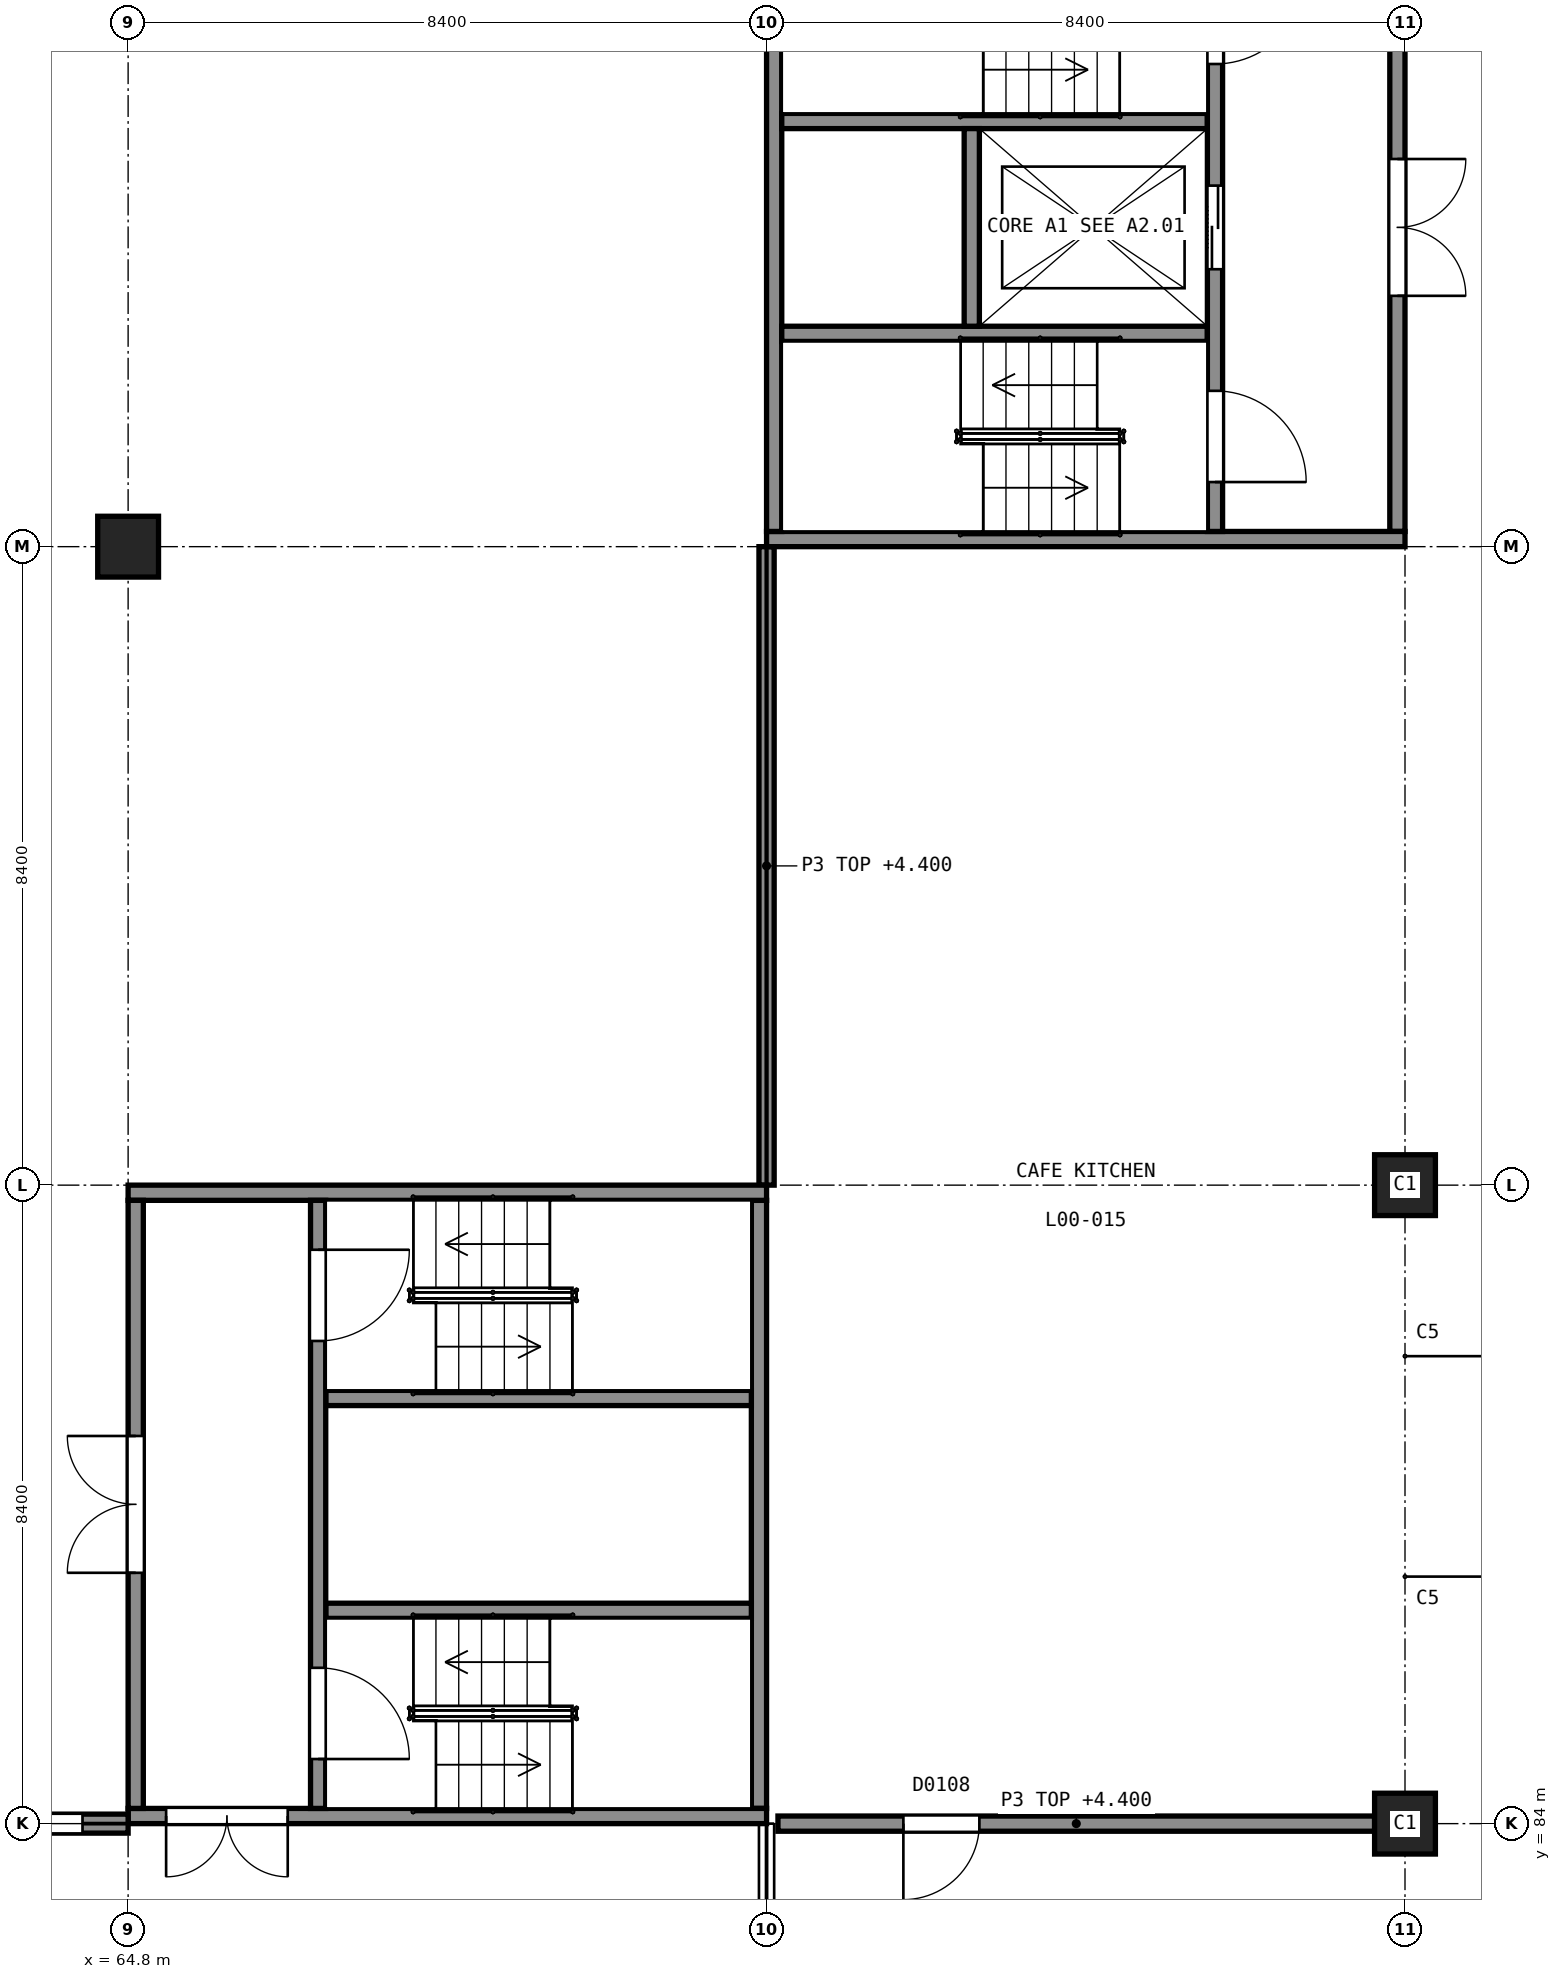
"""IFC4 building model, lengths in metres.
Left out: names, types, materials, properties, quantities, classifications, styles, units other than length and angle.
Written with IfcOpenShell. Run it as: python <this file> out.ifc"""

import sys

from ifc_helpers import new_model, si_unit, direction, frame, frame_2d, origin, origin_2d, place, context, subcontext, project, spatial, rectangle, hollow_rectangle, extrude, element, fill, save


model = new_model("IFC4")
c1 = context("Model", 3, precision=1e-05, world=origin(), true_north=direction((0.0, 1.0)))
c2 = subcontext(c1, "Body", "Model", "MODEL_VIEW")
j1 = project(units=[si_unit("LENGTHUNIT", "METRE"), si_unit("PLANEANGLEUNIT", "RADIAN")], contexts=[c1])
p1 = place(None, origin())
s1 = spatial("IfcSite", under=j1, at=p1, CompositionType="ELEMENT")
p2 = place(p1, origin())
s2 = spatial("IfcBuilding", under=s1, at=p2, CompositionType="ELEMENT")
p3 = place(p2, origin())
s3 = spatial("IfcBuildingStorey", under=s2, at=p3, CompositionType="ELEMENT", Elevation=0.0)
p4 = place(p3, frame((73.2, 100.9, -1.8), z_axis=(0.0, 0.0, 1.0), x_axis=(1.0, 0.0, 0.0)))
e1 = element("IfcWall", 1, at=p4, inside=s3, PredefinedType="SHEAR", context=c2, shape_type="SweptSolid", body=[
    extrude(rectangle(XDim=8.4, YDim=0.2, at=frame_2d((4.2, 0.0))), origin(), (0.0, 0.0, 1.0), 7.3),
])
p5 = place(p3, frame((73.3, 101.0, -1.8), z_axis=(0.0, 0.0, 1.0), x_axis=(0.0, 1.0, 0.0)))
e2 = element("IfcWall", 2, at=p5, inside=s3, PredefinedType="SHEAR", context=c2, shape_type="SweptSolid", body=[
    extrude(rectangle(XDim=8.0, YDim=0.2, at=frame_2d((4.0, 0.0))), origin(), (0.0, 0.0, 1.0), 7.3),
])
p6 = place(p3, frame((81.5, 101.0, -1.8), z_axis=(0.0, 0.0, 1.0), x_axis=(0.0, 1.0, 0.0)))
e3 = element("IfcWall", 3, at=p6, inside=s3, PredefinedType="SHEAR", context=c2, shape_type="SweptSolid", body=[
    extrude(rectangle(XDim=8.0, YDim=0.2, at=frame_2d((4.0, 0.0))), origin(), (0.0, 0.0, 1.0), 7.3),
])
p7 = place(p6, frame((3.1, 0.0, 1.8)))
e4 = element("IfcOpeningElement", 4, at=p7, cuts=e3, PredefinedType="OPENING", context=c2, shape_type="SweptSolid", body=[
    extrude(rectangle(XDim=1.8, YDim=2.1, at=frame_2d((0.9, 1.05))), frame((0.0, 0.11, 0.0), z_axis=(0.0, -1.0, 0.0), x_axis=(1.0, 0.0, 0.0)), (0.0, 0.0, 1.0), 0.22),
])
p8 = place(p3, frame((79.1, 101.0, -1.8), z_axis=(0.0, 0.0, 1.0), x_axis=(0.0, 1.0, 0.0)))
e5 = element("IfcWall", 5, at=p8, inside=s3, PredefinedType="SHEAR", context=c2, shape_type="SweptSolid", body=[
    extrude(rectangle(XDim=8.0, YDim=0.2, at=frame_2d((4.0, 0.0))), origin(), (0.0, 0.0, 1.0), 7.3),
])
p9 = place(p8, frame((0.65, 0.0, 1.8)))
e6 = element("IfcOpeningElement", 6, at=p9, cuts=e5, PredefinedType="OPENING", context=c2, shape_type="SweptSolid", body=[
    extrude(rectangle(XDim=1.2, YDim=2.1, at=frame_2d((0.6, 1.05))), frame((0.0, 0.11, 0.0), z_axis=(0.0, -1.0, 0.0), x_axis=(1.0, 0.0, 0.0)), (0.0, 0.0, 1.0), 0.22),
])
p10 = place(p8, frame((6.15, 0.0, 1.8)))
e7 = element("IfcOpeningElement", 7, at=p10, cuts=e5, PredefinedType="OPENING", context=c2, shape_type="SweptSolid", body=[
    extrude(rectangle(XDim=1.2, YDim=2.1, at=frame_2d((0.6, 1.05))), frame((0.0, 0.11, 0.0), z_axis=(0.0, -1.0, 0.0), x_axis=(1.0, 0.0, 0.0)), (0.0, 0.0, 1.0), 0.22),
])
p11 = place(p8, frame((3.45, 0.0, 1.8)))
e8 = element("IfcOpeningElement", 8, at=p11, cuts=e5, PredefinedType="OPENING", context=c2, shape_type="SweptSolid", body=[
    extrude(rectangle(XDim=1.1, YDim=2.1, at=frame_2d((0.55, 1.05))), frame((0.0, 0.11, 0.0), z_axis=(0.0, -1.0, 0.0), x_axis=(1.0, 0.0, 0.0)), (0.0, 0.0, 1.0), 0.22),
])
for number, where, z_axis, x_axis in (
    (9, (73.4, 103.6, -1.8), (0.0, 0.0, 1.0), (1.0, 0.0, 0.0)),
    (10, (73.4, 106.4, -1.8), (0.0, 0.0, 1.0), (1.0, 0.0, 0.0)),
):
    element("IfcWall", number, at=place(p3, frame(where, z_axis=z_axis, x_axis=x_axis)), inside=s3, PredefinedType="SHEAR", context=c2, shape_type="SweptSolid", body=[
        extrude(rectangle(XDim=5.6, YDim=0.2, at=frame_2d((2.8, 0.0))), origin(), (0.0, 0.0, 1.0), 7.3),
    ])
p12 = place(p3, frame((75.9, 103.7, -1.8), z_axis=(0.0, 0.0, 1.0), x_axis=(0.0, 1.0, 0.0)))
e11 = element("IfcWall", 11, at=p12, inside=s3, PredefinedType="SHEAR", context=c2, shape_type="SweptSolid", body=[
    extrude(rectangle(XDim=2.6, YDim=0.2, at=frame_2d((1.3, 0.0))), origin(), (0.0, 0.0, 1.0), 7.3),
])
p13 = place(p3, frame((73.2, 84.1, -1.8), z_axis=(0.0, 0.0, 1.0), x_axis=(-1.0, 0.0, 0.0)))
e12 = element("IfcWall", 12, at=p13, inside=s3, PredefinedType="SHEAR", context=c2, shape_type="SweptSolid", body=[
    extrude(rectangle(XDim=8.4, YDim=0.2, at=frame_2d((4.2, 0.0))), origin(), (0.0, 0.0, 1.0), 7.3),
])
p14 = place(p13, frame((6.3, 0.0, 1.8)))
e13 = element("IfcOpeningElement", 13, at=p14, cuts=e12, PredefinedType="OPENING", context=c2, shape_type="SweptSolid", body=[
    extrude(rectangle(XDim=1.6, YDim=2.1, at=frame_2d((0.8, 1.05))), frame((0.0, 0.11, 0.0), z_axis=(0.0, -1.0, 0.0), x_axis=(1.0, 0.0, 0.0)), (0.0, 0.0, 1.0), 0.22),
])
p15 = place(p3, frame((64.8, 92.3, -1.8), z_axis=(0.0, 0.0, 1.0), x_axis=(1.0, 0.0, 0.0)))
e14 = element("IfcWall", 14, at=p15, inside=s3, PredefinedType="SHEAR", context=c2, shape_type="SweptSolid", body=[
    extrude(rectangle(XDim=8.4, YDim=0.2, at=frame_2d((4.2, 0.0))), origin(), (0.0, 0.0, 1.0), 7.3),
])
p16 = place(p3, frame((64.9, 84.2, -1.8), z_axis=(0.0, 0.0, 1.0), x_axis=(0.0, 1.0, 0.0)))
e15 = element("IfcWall", 15, at=p16, inside=s3, PredefinedType="SHEAR", context=c2, shape_type="SweptSolid", body=[
    extrude(rectangle(XDim=8.0, YDim=0.2, at=frame_2d((4.0, 0.0))), origin(), (0.0, 0.0, 1.0), 7.3),
])
p17 = place(p16, frame((3.1, 0.0, 1.8)))
e16 = element("IfcOpeningElement", 16, at=p17, cuts=e15, PredefinedType="OPENING", context=c2, shape_type="SweptSolid", body=[
    extrude(rectangle(XDim=1.8, YDim=2.1, at=frame_2d((0.9, 1.05))), frame((0.0, 0.11, 0.0), z_axis=(0.0, -1.0, 0.0), x_axis=(1.0, 0.0, 0.0)), (0.0, 0.0, 1.0), 0.22),
])
p18 = place(p3, frame((73.1, 84.2, -1.8), z_axis=(0.0, 0.0, 1.0), x_axis=(0.0, 1.0, 0.0)))
e17 = element("IfcWall", 17, at=p18, inside=s3, PredefinedType="SHEAR", context=c2, shape_type="SweptSolid", body=[
    extrude(rectangle(XDim=8.0, YDim=0.2, at=frame_2d((4.0, 0.0))), origin(), (0.0, 0.0, 1.0), 7.3),
])
p19 = place(p3, frame((67.3, 84.2, -1.8), z_axis=(0.0, 0.0, 1.0), x_axis=(0.0, 1.0, 0.0)))
e18 = element("IfcWall", 18, at=p19, inside=s3, PredefinedType="SHEAR", context=c2, shape_type="SweptSolid", body=[
    extrude(rectangle(XDim=8.0, YDim=0.2, at=frame_2d((4.0, 0.0))), origin(), (0.0, 0.0, 1.0), 7.3),
])
p20 = place(p19, frame((0.65, 0.0, 1.8)))
e19 = element("IfcOpeningElement", 19, at=p20, cuts=e18, PredefinedType="OPENING", context=c2, shape_type="SweptSolid", body=[
    extrude(rectangle(XDim=1.2, YDim=2.1, at=frame_2d((0.6, 1.05))), frame((0.0, 0.11, 0.0), z_axis=(0.0, -1.0, 0.0), x_axis=(1.0, 0.0, 0.0)), (0.0, 0.0, 1.0), 0.22),
])
p21 = place(p19, frame((6.15, 0.0, 1.8)))
e20 = element("IfcOpeningElement", 20, at=p21, cuts=e18, PredefinedType="OPENING", context=c2, shape_type="SweptSolid", body=[
    extrude(rectangle(XDim=1.2, YDim=2.1, at=frame_2d((0.6, 1.05))), frame((0.0, 0.11, 0.0), z_axis=(0.0, -1.0, 0.0), x_axis=(1.0, 0.0, 0.0)), (0.0, 0.0, 1.0), 0.22),
])
for number, where, z_axis, x_axis in (
    (21, (67.4, 86.8, -1.8), (0.0, 0.0, 1.0), (1.0, 0.0, 0.0)),
    (22, (67.4, 89.6, -1.8), (0.0, 0.0, 1.0), (1.0, 0.0, 0.0)),
):
    element("IfcWall", number, at=place(p3, frame(where, z_axis=z_axis, x_axis=x_axis)), inside=s3, PredefinedType="SHEAR", context=c2, shape_type="SweptSolid", body=[
        extrude(rectangle(XDim=5.6, YDim=0.2, at=frame_2d((2.8, 0.0))), origin(), (0.0, 0.0, 1.0), 7.3),
    ])
for number, where, z_axis, x_axis in (
    (23, (64.8, 100.8, -0.3), (0.0, 0.0, 1.0), (1.0, 0.0, 0.0)),
    (24, (81.6, 84.0, -0.3), (0.0, 0.0, 1.0), (1.0, 0.0, 0.0)),
    (25, (81.6, 92.4, -0.3), (0.0, 0.0, 1.0), (1.0, 0.0, 0.0)),
):
    element("IfcColumn", number, at=place(p3, frame(where, z_axis=z_axis, x_axis=x_axis)), inside=s3, PredefinedType="COLUMN", context=c2, shape_type="SweptSolid", body=[
        extrude(rectangle(XDim=0.8, YDim=0.8, at=origin_2d()), origin(), (0.0, 0.0, 1.0), 5.8),
    ])
p22 = place(p3, frame((56.8, 84.0, 0.0), z_axis=(0.0, 0.0, 1.0), x_axis=(1.0, 0.0, 0.0)))
e26 = element("IfcWall", 26, at=p22, inside=s3, PredefinedType="SOLIDWALL", context=c2, shape_type="SweptSolid", body=[
    extrude(rectangle(XDim=8.0, YDim=0.25, at=frame_2d((4.0, 0.0))), origin(), (0.0, 0.0, 1.0), 4.44),
])
p23 = place(p22, frame((0.6, 0.0, 0.9)))
e27 = element("IfcOpeningElement", 27, at=p23, cuts=e26, PredefinedType="OPENING", context=c2, shape_type="SweptSolid", body=[
    extrude(rectangle(XDim=1.2, YDim=2.1, at=frame_2d((0.6, 1.05))), frame((0.0, 0.135, 0.0), z_axis=(0.0, -1.0, 0.0), x_axis=(1.0, 0.0, 0.0)), (0.0, 0.0, 1.0), 0.27),
])
p24 = place(p22, frame((3.4, 0.0, 0.9)))
e28 = element("IfcOpeningElement", 28, at=p24, cuts=e26, PredefinedType="OPENING", context=c2, shape_type="SweptSolid", body=[
    extrude(rectangle(XDim=1.2, YDim=2.1, at=frame_2d((0.6, 1.05))), frame((0.0, 0.135, 0.0), z_axis=(0.0, -1.0, 0.0), x_axis=(1.0, 0.0, 0.0)), (0.0, 0.0, 1.0), 0.27),
])
p25 = place(p22, frame((6.2, 0.0, 0.9)))
e29 = element("IfcOpeningElement", 29, at=p25, cuts=e26, PredefinedType="OPENING", context=c2, shape_type="SweptSolid", body=[
    extrude(rectangle(XDim=1.2, YDim=2.1, at=frame_2d((0.6, 1.05))), frame((0.0, 0.135, 0.0), z_axis=(0.0, -1.0, 0.0), x_axis=(1.0, 0.0, 0.0)), (0.0, 0.0, 1.0), 0.27),
])
p26 = place(p3, frame((73.2, 92.4, 0.0), z_axis=(0.0, 0.0, 1.0), x_axis=(0.0, 1.0, 0.0)))
e30 = element("IfcWall", 30, at=p26, inside=s3, PredefinedType="PARTITIONING", context=c2, shape_type="SweptSolid", body=[
    extrude(rectangle(XDim=8.4, YDim=0.2, at=frame_2d((4.2, 0.0))), origin(), (0.0, 0.0, 1.0), 4.4),
])
p27 = place(p3, frame((73.35, 84.0, 0.0), z_axis=(0.0, 0.0, 1.0), x_axis=(1.0, 0.0, 0.0)))
e31 = element("IfcWall", 31, at=p27, inside=s3, PredefinedType="PARTITIONING", context=c2, shape_type="SweptSolid", body=[
    extrude(rectangle(XDim=7.85, YDim=0.2, at=frame_2d((3.925, 0.0))), origin(), (0.0, 0.0, 1.0), 4.4),
])
p28 = place(p27, frame((1.65, 0.0, 0.0)))
e32 = element("IfcOpeningElement", 32, at=p28, cuts=e31, PredefinedType="OPENING", context=c2, shape_type="SweptSolid", body=[
    extrude(rectangle(XDim=1.0, YDim=2.1, at=frame_2d((0.5, 1.05))), frame((0.0, 0.11, 0.0), z_axis=(0.0, -1.0, 0.0), x_axis=(1.0, 0.0, 0.0)), (0.0, 0.0, 1.0), 0.22),
])
for number, where, z_axis, x_axis in (
    (33, (81.9, 86.95, -0.3), (0.0, 0.0, 1.0), (1.0, 0.0, 0.0)),
    (34, (81.9, 90.45, -0.3), (0.0, 0.0, 1.0), (1.0, 0.0, 0.0)),
):
    element("IfcColumn", number, at=place(p3, frame(where, z_axis=z_axis, x_axis=x_axis)), inside=s3, PredefinedType="COLUMN", context=c2, shape_type="SweptSolid", body=[
        extrude(hollow_rectangle(XDim=0.25, YDim=0.25, WallThickness=0.012, InnerFilletRadius=0.025, OuterFilletRadius=0.038, at=origin_2d()), origin(), (0.0, 0.0, 1.0), 5.8),
    ])
p29 = place(p25, origin())
e35 = element("IfcWindow", 35, at=p29, inside=s3, PartitioningType="SINGLE_PANEL", PredefinedType="WINDOW", context=c2, shape_type="SweptSolid", body=[
    extrude(rectangle(XDim=1.2, YDim=2.1, at=frame_2d((0.6, 1.05))), frame((0.0, 0.105, 0.0), z_axis=(0.0, -1.0, 0.0), x_axis=(1.0, 0.0, 0.0)), (0.0, 0.0, 1.0), 0.06),
])
fill(e29, e35)
p30 = place(p14, origin())
e36 = element("IfcDoor", 36, at=p30, inside=s3, OperationType="DOUBLE_DOOR_SINGLE_SWING", PredefinedType="DOOR", context=c2, shape_type="SweptSolid", body=[
    extrude(rectangle(XDim=1.6, YDim=2.1, at=frame_2d((0.8, 1.05))), frame((0.0, 0.025, 0.0), z_axis=(0.0, -1.0, 0.0), x_axis=(1.0, 0.0, 0.0)), (0.0, 0.0, 1.0), 0.05),
])
fill(e13, e36)
p31 = place(p28, origin())
e37 = element("IfcDoor", 37, at=p31, inside=s3, OperationType="SINGLE_SWING_LEFT", PredefinedType="DOOR", context=c2, shape_type="SweptSolid", body=[
    extrude(rectangle(XDim=1.0, YDim=2.1, at=frame_2d((0.5, 1.05))), frame((0.0, 0.025, 0.0), z_axis=(0.0, -1.0, 0.0), x_axis=(1.0, 0.0, 0.0)), (0.0, 0.0, 1.0), 0.05),
])
fill(e32, e37)
p32 = place(p7, origin())
e38 = element("IfcDoor", 38, at=p32, inside=s3, OperationType="DOUBLE_DOOR_SINGLE_SWING", PredefinedType="DOOR", context=c2, shape_type="SweptSolid", body=[
    extrude(rectangle(XDim=1.8, YDim=2.1, at=frame_2d((0.9, 1.05))), frame((0.0, 0.025, 0.0), z_axis=(0.0, -1.0, 0.0), x_axis=(1.0, 0.0, 0.0)), (0.0, 0.0, 1.0), 0.05),
])
fill(e4, e38)
p33 = place(p9, origin())
e39 = element("IfcDoor", 39, at=p33, inside=s3, OperationType="SINGLE_SWING_LEFT", PredefinedType="DOOR", context=c2, shape_type="SweptSolid", body=[
    extrude(rectangle(XDim=1.2, YDim=2.1, at=frame_2d((0.6, 1.05))), frame((0.0, 0.025, 0.0), z_axis=(0.0, -1.0, 0.0), x_axis=(1.0, 0.0, 0.0)), (0.0, 0.0, 1.0), 0.05),
])
fill(e6, e39)
p34 = place(p10, origin())
e40 = element("IfcDoor", 40, at=p34, inside=s3, OperationType="SINGLE_SWING_RIGHT", PredefinedType="DOOR", context=c2, shape_type="SweptSolid", body=[
    extrude(rectangle(XDim=1.2, YDim=2.1, at=frame_2d((0.6, 1.05))), frame((0.0, 0.025, 0.0), z_axis=(0.0, -1.0, 0.0), x_axis=(1.0, 0.0, 0.0)), (0.0, 0.0, 1.0), 0.05),
])
fill(e7, e40)
p35 = place(p11, origin())
e41 = element("IfcDoor", 41, at=p35, inside=s3, OperationType="DOUBLE_DOOR_SLIDING", PredefinedType="DOOR", context=c2, shape_type="SweptSolid", body=[
    extrude(rectangle(XDim=1.1, YDim=2.1, at=frame_2d((0.55, 1.05))), frame((0.0, 0.025, 0.0), z_axis=(0.0, -1.0, 0.0), x_axis=(1.0, 0.0, 0.0)), (0.0, 0.0, 1.0), 0.05),
])
fill(e8, e41)
p36 = place(p17, origin())
e42 = element("IfcDoor", 42, at=p36, inside=s3, OperationType="DOUBLE_DOOR_SINGLE_SWING", PredefinedType="DOOR", context=c2, shape_type="SweptSolid", body=[
    extrude(rectangle(XDim=1.8, YDim=2.1, at=frame_2d((0.9, 1.05))), frame((0.0, 0.025, 0.0), z_axis=(0.0, -1.0, 0.0), x_axis=(1.0, 0.0, 0.0)), (0.0, 0.0, 1.0), 0.05),
])
fill(e16, e42)
p37 = place(p20, origin())
e43 = element("IfcDoor", 43, at=p37, inside=s3, OperationType="SINGLE_SWING_LEFT", PredefinedType="DOOR", context=c2, shape_type="SweptSolid", body=[
    extrude(rectangle(XDim=1.2, YDim=2.1, at=frame_2d((0.6, 1.05))), frame((0.0, 0.025, 0.0), z_axis=(0.0, -1.0, 0.0), x_axis=(1.0, 0.0, 0.0)), (0.0, 0.0, 1.0), 0.05),
])
fill(e19, e43)
p38 = place(p21, origin())
e44 = element("IfcDoor", 44, at=p38, inside=s3, OperationType="SINGLE_SWING_RIGHT", PredefinedType="DOOR", context=c2, shape_type="SweptSolid", body=[
    extrude(rectangle(XDim=1.2, YDim=2.1, at=frame_2d((0.6, 1.05))), frame((0.0, 0.025, 0.0), z_axis=(0.0, -1.0, 0.0), x_axis=(1.0, 0.0, 0.0)), (0.0, 0.0, 1.0), 0.05),
])
fill(e20, e44)
save(model, sys.argv[1])
